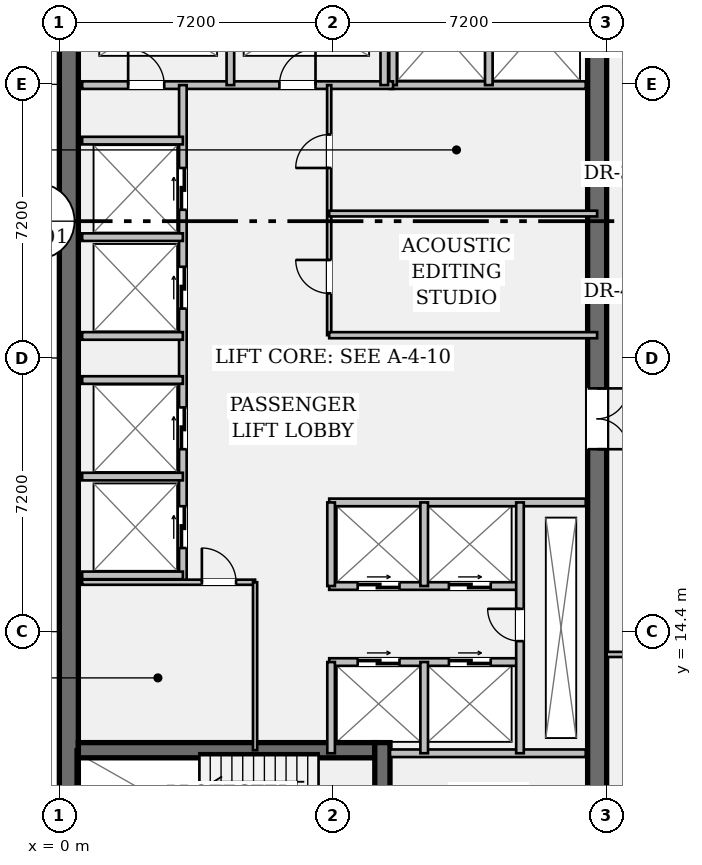
"""IFC4 building model, lengths in metres.
Left out: names, types, materials, properties, quantities, classifications, styles, units other than length and angle.
Written with IfcOpenShell. Run it as: python <this file> out.ifc"""

import sys

from ifc_helpers import new_model, si_unit, direction, frame, frame_2d, origin, place, context, subcontext, project, spatial, rectangle, extrude, element, fill, save


model = new_model("IFC4")
c1 = context("Model", 3, precision=1e-05, world=origin(), true_north=direction((0.0, 1.0)))
c2 = subcontext(c1, "Body", "Model", "MODEL_VIEW")
j1 = project(units=[si_unit("LENGTHUNIT", "METRE"), si_unit("PLANEANGLEUNIT", "RADIAN")], contexts=[c1])
p1 = place(None, origin())
s1 = spatial("IfcSite", under=j1, at=p1, CompositionType="ELEMENT")
p2 = place(p1, origin())
s2 = spatial("IfcBuilding", under=s1, at=p2, CompositionType="ELEMENT")
p3 = place(p2, frame((0.0, 0.0, 168.7)))
s3 = spatial("IfcBuildingStorey", under=s2, at=p3, CompositionType="ELEMENT", Elevation=168.7)
p4 = place(p3, frame((0.25, 7.2, 0.0), z_axis=(0.0, 0.0, 1.0), x_axis=(0.0, 1.0, 0.0)))
e1 = element("IfcWall", 1, at=p4, inside=s3, PredefinedType="SHEAR", context=c2, shape_type="SweptSolid", body=[
    extrude(rectangle(XDim=28.8, YDim=0.5, at=frame_2d((14.4, 0.0))), origin(), (0.0, 0.0, 1.0), 4.29),
])
p5 = place(p3, frame((14.15, 35.5, 0.0), z_axis=(0.0, 0.0, 1.0), x_axis=(0.0, -1.0, 0.0)))
e2 = element("IfcWall", 2, at=p5, inside=s3, PredefinedType="SHEAR", context=c2, shape_type="SweptSolid", body=[
    extrude(rectangle(XDim=27.8, YDim=0.5, at=frame_2d((13.9, 0.0))), origin(), (0.0, 0.0, 1.0), 4.29),
])
p6 = place(p5, frame((1.4, 0.0, 0.0)))
e3 = element("IfcOpeningElement", 3, at=p6, cuts=e2, PredefinedType="OPENING", context=c2, shape_type="SweptSolid", body=[
    extrude(rectangle(XDim=1.2, YDim=2.15, at=frame_2d((0.6, 1.075))), frame((0.0, 0.262, 0.0), z_axis=(0.0, -1.0, 0.0), x_axis=(1.0, 0.0, 0.0)), (0.0, 0.0, 1.0), 0.524),
])
p7 = place(p5, frame((25.35, 0.0, 0.0)))
e4 = element("IfcOpeningElement", 4, at=p7, cuts=e2, PredefinedType="OPENING", context=c2, shape_type="SweptSolid", body=[
    extrude(rectangle(XDim=1.2, YDim=2.15, at=frame_2d((0.6, 1.075))), frame((0.0, 0.262, 0.0), z_axis=(0.0, -1.0, 0.0), x_axis=(1.0, 0.0, 0.0)), (0.0, 0.0, 1.0), 0.524),
])
p8 = place(p5, frame((14.7, 0.0, 0.0)))
e5 = element("IfcOpeningElement", 5, at=p8, cuts=e2, PredefinedType="OPENING", context=c2, shape_type="SweptSolid", body=[
    extrude(rectangle(XDim=1.6, YDim=2.2, at=frame_2d((0.8, 1.1))), frame((0.0, 0.262, 0.0), z_axis=(0.0, -1.0, 0.0), x_axis=(1.0, 0.0, 0.0)), (0.0, 0.0, 1.0), 0.524),
])
p9 = place(p3, frame((0.5, 11.28, 0.0), z_axis=(0.0, 0.0, 1.0), x_axis=(1.0, 0.0, 0.0)))
e6 = element("IfcWall", 6, at=p9, inside=s3, PredefinedType="SHEAR", context=c2, shape_type="SweptSolid", body=[
    extrude(rectangle(XDim=7.8, YDim=0.4, at=frame_2d((3.9, 0.0))), origin(), (0.0, 0.0, 1.0), 4.29),
])
p10 = place(p3, frame((8.5, 7.7, 0.0), z_axis=(0.0, 0.0, 1.0), x_axis=(0.0, 1.0, 0.0)))
e7 = element("IfcWall", 7, at=p10, inside=s3, PredefinedType="SHEAR", context=c2, shape_type="SweptSolid", body=[
    extrude(rectangle(XDim=3.78, YDim=0.4, at=frame_2d((1.89, 0.0))), origin(), (0.0, 0.0, 1.0), 4.29),
])
p11 = place(p10, frame((0.85, 0.0, 0.0)))
e8 = element("IfcOpeningElement", 8, at=p11, cuts=e7, PredefinedType="OPENING", context=c2, shape_type="SweptSolid", body=[
    extrude(rectangle(XDim=1.1, YDim=2.15, at=frame_2d((0.55, 1.075))), frame((0.0, 0.212, 0.0), z_axis=(0.0, -1.0, 0.0), x_axis=(1.0, 0.0, 0.0)), (0.0, 0.0, 1.0), 0.424),
])
for number, where, z_axis, x_axis in (
    (9, (8.7, 11.2, 0.0), (0.0, 0.0, 1.0), (1.0, 0.0, 0.0)),
    (10, (8.7, 28.78, 0.0), (0.0, 0.0, 1.0), (1.0, 0.0, 0.0)),
):
    element("IfcWall", number, at=place(p3, frame(where, z_axis=z_axis, x_axis=x_axis)), inside=s3, PredefinedType="PARTITIONING", context=c2, shape_type="SweptSolid", body=[
        extrude(rectangle(XDim=5.15, YDim=0.2, at=frame_2d((2.575, 0.0))), origin(), (0.0, 0.0, 1.0), 4.29),
    ])
for number, where, z_axis, x_axis in (
    (11, (8.78, 28.78, 0.0), (0.0, 0.0, 1.0), (0.0, 1.0, 0.0)),
    (12, (11.3, 28.78, 0.0), (0.0, 0.0, 1.0), (0.0, 1.0, 0.0)),
):
    element("IfcWall", number, at=place(p3, frame(where, z_axis=z_axis, x_axis=x_axis)), inside=s3, PredefinedType="PARTITIONING", context=c2, shape_type="SweptSolid", body=[
        extrude(rectangle(XDim=3.1, YDim=0.2, at=frame_2d((1.55, 0.0))), origin(), (0.0, 0.0, 1.0), 4.29),
    ])
p12 = place(p3, frame((0.6, 28.78, 0.0), z_axis=(0.0, 0.0, 1.0), x_axis=(1.0, 0.0, 0.0)))
e13 = element("IfcWall", 13, at=p12, inside=s3, PredefinedType="PARTITIONING", context=c2, shape_type="SweptSolid", body=[
    extrude(rectangle(XDim=8.18, YDim=0.2, at=frame_2d((4.09, 0.0))), origin(), (0.0, 0.0, 1.0), 4.29),
])
p13 = place(p12, frame((1.21, 0.0, 0.0)))
e14 = element("IfcOpeningElement", 14, at=p13, cuts=e13, PredefinedType="OPENING", context=c2, shape_type="SweptSolid", body=[
    extrude(rectangle(XDim=0.95, YDim=2.15, at=frame_2d((0.475, 1.075))), frame((0.0, 0.112, 0.0), z_axis=(0.0, -1.0, 0.0), x_axis=(1.0, 0.0, 0.0)), (0.0, 0.0, 1.0), 0.224),
])
p14 = place(p12, frame((5.19, 0.0, 0.0)))
e15 = element("IfcOpeningElement", 15, at=p14, cuts=e13, PredefinedType="OPENING", context=c2, shape_type="SweptSolid", body=[
    extrude(rectangle(XDim=0.95, YDim=2.15, at=frame_2d((0.475, 1.075))), frame((0.0, 0.112, 0.0), z_axis=(0.0, -1.0, 0.0), x_axis=(1.0, 0.0, 0.0)), (0.0, 0.0, 1.0), 0.224),
])
for number, where, z_axis, x_axis in (
    (16, (4.5, 28.78, 0.0), (0.0, 0.0, 1.0), (0.0, 1.0, 0.0)),
    (17, (8.55, 28.78, 0.0), (0.0, 0.0, 1.0), (0.0, 1.0, 0.0)),
):
    element("IfcWall", number, at=place(p3, frame(where, z_axis=z_axis, x_axis=x_axis)), inside=s3, PredefinedType="PARTITIONING", context=c2, shape_type="SweptSolid", body=[
        extrude(rectangle(XDim=2.94, YDim=0.2, at=frame_2d((1.47, 0.0))), origin(), (0.0, 0.0, 1.0), 4.29),
    ])
p15 = place(p3, frame((3.25, 15.7, 0.0), z_axis=(0.0, 0.0, 1.0), x_axis=(0.0, 1.0, 0.0)))
e18 = element("IfcWall", 18, at=p15, inside=s3, PredefinedType="PARTITIONING", context=c2, shape_type="SweptSolid", body=[
    extrude(rectangle(XDim=13.08, YDim=0.2, at=frame_2d((6.54, 0.0))), origin(), (0.0, 0.0, 1.0), 4.29),
])
p16 = place(p15, frame((0.9, 0.0, 0.0)))
e19 = element("IfcOpeningElement", 19, at=p16, cuts=e18, PredefinedType="OPENING", context=c2, shape_type="SweptSolid", body=[
    extrude(rectangle(XDim=1.1, YDim=2.2, at=frame_2d((0.55, 1.1))), frame((0.0, 0.112, 0.0), z_axis=(0.0, -1.0, 0.0), x_axis=(1.0, 0.0, 0.0)), (0.0, 0.0, 1.0), 0.224),
])
p17 = place(p15, frame((3.5, 0.0, 0.0)))
e20 = element("IfcOpeningElement", 20, at=p17, cuts=e18, PredefinedType="OPENING", context=c2, shape_type="SweptSolid", body=[
    extrude(rectangle(XDim=1.1, YDim=2.2, at=frame_2d((0.55, 1.1))), frame((0.0, 0.112, 0.0), z_axis=(0.0, -1.0, 0.0), x_axis=(1.0, 0.0, 0.0)), (0.0, 0.0, 1.0), 0.224),
])
p18 = place(p15, frame((7.2, 0.0, 0.0)))
e21 = element("IfcOpeningElement", 21, at=p18, cuts=e18, PredefinedType="OPENING", context=c2, shape_type="SweptSolid", body=[
    extrude(rectangle(XDim=1.1, YDim=2.2, at=frame_2d((0.55, 1.1))), frame((0.0, 0.112, 0.0), z_axis=(0.0, -1.0, 0.0), x_axis=(1.0, 0.0, 0.0)), (0.0, 0.0, 1.0), 0.224),
])
p19 = place(p15, frame((9.8, 0.0, 0.0)))
e22 = element("IfcOpeningElement", 22, at=p19, cuts=e18, PredefinedType="OPENING", context=c2, shape_type="SweptSolid", body=[
    extrude(rectangle(XDim=1.1, YDim=2.2, at=frame_2d((0.55, 1.1))), frame((0.0, 0.112, 0.0), z_axis=(0.0, -1.0, 0.0), x_axis=(1.0, 0.0, 0.0)), (0.0, 0.0, 1.0), 0.224),
])
for number, where, z_axis, x_axis in (
    (23, (0.6, 15.88, 0.0), (0.0, 0.0, 1.0), (1.0, 0.0, 0.0)),
    (24, (0.6, 18.48, 0.0), (0.0, 0.0, 1.0), (1.0, 0.0, 0.0)),
    (25, (0.6, 22.18, 0.0), (0.0, 0.0, 1.0), (1.0, 0.0, 0.0)),
    (26, (0.6, 24.78, 0.0), (0.0, 0.0, 1.0), (1.0, 0.0, 0.0)),
    (27, (0.6, 21.02, 0.0), (0.0, 0.0, 1.0), (1.0, 0.0, 0.0)),
    (28, (0.6, 27.32, 0.0), (0.0, 0.0, 1.0), (1.0, 0.0, 0.0)),
):
    element("IfcWall", number, at=place(p3, frame(where, z_axis=z_axis, x_axis=x_axis)), inside=s3, PredefinedType="PARTITIONING", context=c2, shape_type="SweptSolid", body=[
        extrude(rectangle(XDim=2.65, YDim=0.2, at=frame_2d((1.325, 0.0))), origin(), (0.0, 0.0, 1.0), 4.29),
    ])
p20 = place(p3, frame((7.1, 22.2, 0.0), z_axis=(0.0, 0.0, 1.0), x_axis=(0.0, 1.0, 0.0)))
e29 = element("IfcWall", 29, at=p20, inside=s3, PredefinedType="PARTITIONING", context=c2, shape_type="SweptSolid", body=[
    extrude(rectangle(XDim=6.58, YDim=0.11, at=frame_2d((3.29, 0.0))), origin(), (0.0, 0.0, 1.0), 4.29),
])
p21 = place(p20, frame((1.1, 0.0, 0.0)))
e30 = element("IfcOpeningElement", 30, at=p21, cuts=e29, PredefinedType="OPENING", context=c2, shape_type="SweptSolid", body=[
    extrude(rectangle(XDim=0.88, YDim=2.15, at=frame_2d((0.44, 1.075))), frame((0.0, 0.067, 0.0), z_axis=(0.0, -1.0, 0.0), x_axis=(1.0, 0.0, 0.0)), (0.0, 0.0, 1.0), 0.134),
])
p22 = place(p20, frame((4.4, 0.0, 0.0)))
e31 = element("IfcOpeningElement", 31, at=p22, cuts=e29, PredefinedType="OPENING", context=c2, shape_type="SweptSolid", body=[
    extrude(rectangle(XDim=0.88, YDim=2.15, at=frame_2d((0.44, 1.075))), frame((0.0, 0.067, 0.0), z_axis=(0.0, -1.0, 0.0), x_axis=(1.0, 0.0, 0.0)), (0.0, 0.0, 1.0), 0.134),
])
p23 = place(p3, frame((7.1, 22.2, 0.0), z_axis=(0.0, 0.0, 1.0), x_axis=(1.0, 0.0, 0.0)))
e32 = element("IfcWall", 32, at=p23, inside=s3, PredefinedType="PARTITIONING", context=c2, shape_type="SweptSolid", body=[
    extrude(rectangle(XDim=7.05, YDim=0.16, at=frame_2d((3.525, 0.0))), origin(), (0.0, 0.0, 1.0), 4.29),
])
p24 = place(p3, frame((7.1, 25.4, 0.0), z_axis=(0.0, 0.0, 1.0), x_axis=(1.0, 0.0, 0.0)))
e33 = element("IfcWall", 33, at=p24, inside=s3, PredefinedType="PARTITIONING", context=c2, shape_type="SweptSolid", body=[
    extrude(rectangle(XDim=7.05, YDim=0.15, at=frame_2d((3.525, 0.0))), origin(), (0.0, 0.0, 1.0), 4.29),
])
p25 = place(p3, frame((7.1, 17.8, 0.0), z_axis=(0.0, 0.0, 1.0), x_axis=(1.0, 0.0, 0.0)))
e34 = element("IfcWall", 34, at=p25, inside=s3, PredefinedType="PARTITIONING", context=c2, shape_type="SweptSolid", body=[
    extrude(rectangle(XDim=6.75, YDim=0.2, at=frame_2d((3.375, 0.0))), origin(), (0.0, 0.0, 1.0), 4.29),
])
p26 = place(p3, frame((7.1, 15.6, 0.0), z_axis=(0.0, 0.0, 1.0), x_axis=(1.0, 0.0, 0.0)))
e35 = element("IfcWall", 35, at=p26, inside=s3, PredefinedType="PARTITIONING", context=c2, shape_type="SweptSolid", body=[
    extrude(rectangle(XDim=5.02, YDim=0.2, at=frame_2d((2.51, 0.0))), origin(), (0.0, 0.0, 1.0), 4.29),
])
p27 = place(p26, frame((0.75, 0.0, 0.0)))
e36 = element("IfcOpeningElement", 36, at=p27, cuts=e35, PredefinedType="OPENING", context=c2, shape_type="SweptSolid", body=[
    extrude(rectangle(XDim=1.1, YDim=2.2, at=frame_2d((0.55, 1.1))), frame((0.0, 0.112, 0.0), z_axis=(0.0, -1.0, 0.0), x_axis=(1.0, 0.0, 0.0)), (0.0, 0.0, 1.0), 0.224),
])
p28 = place(p26, frame((3.15, 0.0, 0.0)))
e37 = element("IfcOpeningElement", 37, at=p28, cuts=e35, PredefinedType="OPENING", context=c2, shape_type="SweptSolid", body=[
    extrude(rectangle(XDim=1.1, YDim=2.2, at=frame_2d((0.55, 1.1))), frame((0.0, 0.112, 0.0), z_axis=(0.0, -1.0, 0.0), x_axis=(1.0, 0.0, 0.0)), (0.0, 0.0, 1.0), 0.224),
])
p29 = place(p3, frame((7.1, 13.6, 0.0), z_axis=(0.0, 0.0, 1.0), x_axis=(1.0, 0.0, 0.0)))
e38 = element("IfcWall", 38, at=p29, inside=s3, PredefinedType="PARTITIONING", context=c2, shape_type="SweptSolid", body=[
    extrude(rectangle(XDim=5.02, YDim=0.2, at=frame_2d((2.51, 0.0))), origin(), (0.0, 0.0, 1.0), 4.29),
])
p30 = place(p29, frame((0.75, 0.0, 0.0)))
e39 = element("IfcOpeningElement", 39, at=p30, cuts=e38, PredefinedType="OPENING", context=c2, shape_type="SweptSolid", body=[
    extrude(rectangle(XDim=1.1, YDim=2.2, at=frame_2d((0.55, 1.1))), frame((0.0, 0.112, 0.0), z_axis=(0.0, -1.0, 0.0), x_axis=(1.0, 0.0, 0.0)), (0.0, 0.0, 1.0), 0.224),
])
p31 = place(p29, frame((3.15, 0.0, 0.0)))
e40 = element("IfcOpeningElement", 40, at=p31, cuts=e38, PredefinedType="OPENING", context=c2, shape_type="SweptSolid", body=[
    extrude(rectangle(XDim=1.1, YDim=2.2, at=frame_2d((0.55, 1.1))), frame((0.0, 0.112, 0.0), z_axis=(0.0, -1.0, 0.0), x_axis=(1.0, 0.0, 0.0)), (0.0, 0.0, 1.0), 0.224),
])
p32 = place(p3, frame((7.15, 15.6, 0.0), z_axis=(0.0, 0.0, 1.0), x_axis=(0.0, 1.0, 0.0)))
e41 = element("IfcWall", 41, at=p32, inside=s3, PredefinedType="PARTITIONING", context=c2, shape_type="SweptSolid", body=[
    extrude(rectangle(XDim=2.2, YDim=0.2, at=frame_2d((1.1, 0.0))), origin(), (0.0, 0.0, 1.0), 4.29),
])
p33 = place(p3, frame((7.15, 11.2, 0.0), z_axis=(0.0, 0.0, 1.0), x_axis=(0.0, 1.0, 0.0)))
e42 = element("IfcWall", 42, at=p33, inside=s3, PredefinedType="PARTITIONING", context=c2, shape_type="SweptSolid", body=[
    extrude(rectangle(XDim=2.4, YDim=0.2, at=frame_2d((1.2, 0.0))), origin(), (0.0, 0.0, 1.0), 4.29),
])
p34 = place(p3, frame((9.6, 15.6, 0.0), z_axis=(0.0, 0.0, 1.0), x_axis=(0.0, 1.0, 0.0)))
e43 = element("IfcWall", 43, at=p34, inside=s3, PredefinedType="PARTITIONING", context=c2, shape_type="SweptSolid", body=[
    extrude(rectangle(XDim=2.2, YDim=0.2, at=frame_2d((1.1, 0.0))), origin(), (0.0, 0.0, 1.0), 4.29),
])
p35 = place(p3, frame((9.6, 11.2, 0.0), z_axis=(0.0, 0.0, 1.0), x_axis=(0.0, 1.0, 0.0)))
e44 = element("IfcWall", 44, at=p35, inside=s3, PredefinedType="PARTITIONING", context=c2, shape_type="SweptSolid", body=[
    extrude(rectangle(XDim=2.4, YDim=0.2, at=frame_2d((1.2, 0.0))), origin(), (0.0, 0.0, 1.0), 4.29),
])
p36 = place(p3, frame((12.12, 11.2, 0.0), z_axis=(0.0, 0.0, 1.0), x_axis=(0.0, 1.0, 0.0)))
e45 = element("IfcWall", 45, at=p36, inside=s3, PredefinedType="PARTITIONING", context=c2, shape_type="SweptSolid", body=[
    extrude(rectangle(XDim=6.6, YDim=0.2, at=frame_2d((3.3, 0.0))), origin(), (0.0, 0.0, 1.0), 4.29),
])
p37 = place(p36, frame((2.95, 0.0, 0.0)))
e46 = element("IfcOpeningElement", 46, at=p37, cuts=e45, PredefinedType="OPENING", context=c2, shape_type="SweptSolid", body=[
    extrude(rectangle(XDim=0.85, YDim=2.15, at=frame_2d((0.425, 1.075))), frame((0.0, 0.112, 0.0), z_axis=(0.0, -1.0, 0.0), x_axis=(1.0, 0.0, 0.0)), (0.0, 0.0, 1.0), 0.224),
])
p38 = place(p3, frame((0.6, 15.7, 0.0), z_axis=(0.0, 0.0, 1.0), x_axis=(1.0, 0.0, 0.0)))
e47 = element("IfcWall", 47, at=p38, inside=s3, PredefinedType="PARTITIONING", context=c2, shape_type="SweptSolid", body=[
    extrude(rectangle(XDim=4.55, YDim=0.135, at=frame_2d((2.275, 0.0))), origin(), (0.0, 0.0, 1.0), 4.29),
])
p39 = place(p38, frame((3.15, 0.0, 0.0)))
e48 = element("IfcOpeningElement", 48, at=p39, cuts=e47, PredefinedType="OPENING", context=c2, shape_type="SweptSolid", body=[
    extrude(rectangle(XDim=0.9, YDim=2.15, at=frame_2d((0.45, 1.075))), frame((0.0, 0.08, 0.0), z_axis=(0.0, -1.0, 0.0), x_axis=(1.0, 0.0, 0.0)), (0.0, 0.0, 1.0), 0.159),
])
p40 = place(p3, frame((5.15, 11.28, 0.0), z_axis=(0.0, 0.0, 1.0), x_axis=(0.0, 1.0, 0.0)))
e49 = element("IfcWall", 49, at=p40, inside=s3, PredefinedType="PARTITIONING", context=c2, shape_type="SweptSolid", body=[
    extrude(rectangle(XDim=4.42, YDim=0.11, at=frame_2d((2.21, 0.0))), origin(), (0.0, 0.0, 1.0), 4.29),
])
p41 = place(p3, frame((14.4, 13.8, 0.0), z_axis=(0.0, 0.0, 1.0), x_axis=(1.0, 0.0, 0.0)))
e50 = element("IfcWall", 50, at=p41, inside=s3, PredefinedType="PARTITIONING", context=c2, shape_type="SweptSolid", body=[
    extrude(rectangle(XDim=29.48, YDim=0.135, at=frame_2d((14.74, 0.0))), origin(), (0.0, 0.0, 1.0), 3.653),
])
p42 = place(p41, frame((4.72, 0.0, 0.0)))
e51 = element("IfcOpeningElement", 51, at=p42, cuts=e50, PredefinedType="OPENING", context=c2, shape_type="SweptSolid", body=[
    extrude(rectangle(XDim=1.05, YDim=2.15, at=frame_2d((0.525, 1.075))), frame((0.0, 0.08, 0.0), z_axis=(0.0, -1.0, 0.0), x_axis=(1.0, 0.0, 0.0)), (0.0, 0.0, 1.0), 0.159),
])
p43 = place(p41, frame((13.0, 0.0, 0.0)))
e52 = element("IfcOpeningElement", 52, at=p43, cuts=e50, PredefinedType="OPENING", context=c2, shape_type="SweptSolid", body=[
    extrude(rectangle(XDim=0.88, YDim=2.15, at=frame_2d((0.44, 1.075))), frame((0.0, 0.08, 0.0), z_axis=(0.0, -1.0, 0.0), x_axis=(1.0, 0.0, 0.0)), (0.0, 0.0, 1.0), 0.159),
])
p44 = place(p13, origin())
e53 = element("IfcDoor", 53, at=p44, inside=s3, OperationType="SINGLE_SWING_LEFT", PredefinedType="DOOR", context=c2, shape_type="SweptSolid", body=[
    extrude(rectangle(XDim=0.95, YDim=2.15, at=frame_2d((0.475, 1.075))), frame((0.0, 0.025, 0.0), z_axis=(0.0, -1.0, 0.0), x_axis=(1.0, 0.0, 0.0)), (0.0, 0.0, 1.0), 0.05),
])
fill(e14, e53)
p45 = place(p14, origin())
e54 = element("IfcDoor", 54, at=p45, inside=s3, OperationType="SINGLE_SWING_RIGHT", PredefinedType="DOOR", context=c2, shape_type="SweptSolid", body=[
    extrude(rectangle(XDim=0.95, YDim=2.15, at=frame_2d((0.475, 1.075))), frame((0.0, 0.025, 0.0), z_axis=(0.0, -1.0, 0.0), x_axis=(1.0, 0.0, 0.0)), (0.0, 0.0, 1.0), 0.05),
])
fill(e15, e54)
p46 = place(p8, origin())
e55 = element("IfcDoor", 55, at=p46, inside=s3, OperationType="DOUBLE_DOOR_SINGLE_SWING", PredefinedType="DOOR", context=c2, shape_type="SweptSolid", body=[
    extrude(rectangle(XDim=1.6, YDim=2.2, at=frame_2d((0.8, 1.1))), frame((0.0, 0.025, 0.0), z_axis=(0.0, -1.0, 0.0), x_axis=(1.0, 0.0, 0.0)), (0.0, 0.0, 1.0), 0.05),
])
fill(e5, e55)
p47 = place(p16, origin())
e56 = element("IfcDoor", 56, at=p47, inside=s3, OperationType="DOUBLE_DOOR_SLIDING", PredefinedType="DOOR", context=c2, shape_type="SweptSolid", body=[
    extrude(rectangle(XDim=1.1, YDim=2.2, at=frame_2d((0.55, 1.1))), frame((0.0, 0.025, 0.0), z_axis=(0.0, -1.0, 0.0), x_axis=(1.0, 0.0, 0.0)), (0.0, 0.0, 1.0), 0.05),
])
fill(e19, e56)
p48 = place(p17, origin())
e57 = element("IfcDoor", 57, at=p48, inside=s3, OperationType="DOUBLE_DOOR_SLIDING", PredefinedType="DOOR", context=c2, shape_type="SweptSolid", body=[
    extrude(rectangle(XDim=1.1, YDim=2.2, at=frame_2d((0.55, 1.1))), frame((0.0, 0.025, 0.0), z_axis=(0.0, -1.0, 0.0), x_axis=(1.0, 0.0, 0.0)), (0.0, 0.0, 1.0), 0.05),
])
fill(e20, e57)
p49 = place(p18, origin())
e58 = element("IfcDoor", 58, at=p49, inside=s3, OperationType="DOUBLE_DOOR_SLIDING", PredefinedType="DOOR", context=c2, shape_type="SweptSolid", body=[
    extrude(rectangle(XDim=1.1, YDim=2.2, at=frame_2d((0.55, 1.1))), frame((0.0, 0.025, 0.0), z_axis=(0.0, -1.0, 0.0), x_axis=(1.0, 0.0, 0.0)), (0.0, 0.0, 1.0), 0.05),
])
fill(e21, e58)
p50 = place(p19, origin())
e59 = element("IfcDoor", 59, at=p50, inside=s3, OperationType="DOUBLE_DOOR_SLIDING", PredefinedType="DOOR", context=c2, shape_type="SweptSolid", body=[
    extrude(rectangle(XDim=1.1, YDim=2.2, at=frame_2d((0.55, 1.1))), frame((0.0, 0.025, 0.0), z_axis=(0.0, -1.0, 0.0), x_axis=(1.0, 0.0, 0.0)), (0.0, 0.0, 1.0), 0.05),
])
fill(e22, e59)
p51 = place(p21, origin())
e60 = element("IfcDoor", 60, at=p51, inside=s3, OperationType="SINGLE_SWING_RIGHT", PredefinedType="DOOR", context=c2, shape_type="SweptSolid", body=[
    extrude(rectangle(XDim=0.88, YDim=2.15, at=frame_2d((0.44, 1.075))), frame((0.0, 0.025, 0.0), z_axis=(0.0, -1.0, 0.0), x_axis=(1.0, 0.0, 0.0)), (0.0, 0.0, 1.0), 0.05),
])
fill(e30, e60)
p52 = place(p22, origin())
e61 = element("IfcDoor", 61, at=p52, inside=s3, OperationType="SINGLE_SWING_LEFT", PredefinedType="DOOR", context=c2, shape_type="SweptSolid", body=[
    extrude(rectangle(XDim=0.88, YDim=2.15, at=frame_2d((0.44, 1.075))), frame((0.0, 0.025, 0.0), z_axis=(0.0, -1.0, 0.0), x_axis=(1.0, 0.0, 0.0)), (0.0, 0.0, 1.0), 0.05),
])
fill(e31, e61)
p53 = place(p37, origin())
e62 = element("IfcDoor", 62, at=p53, inside=s3, OperationType="SINGLE_SWING_RIGHT", PredefinedType="DOOR", context=c2, shape_type="SweptSolid", body=[
    extrude(rectangle(XDim=0.85, YDim=2.15, at=frame_2d((0.425, 1.075))), frame((0.0, 0.025, 0.0), z_axis=(0.0, -1.0, 0.0), x_axis=(1.0, 0.0, 0.0)), (0.0, 0.0, 1.0), 0.05),
])
fill(e46, e62)
p54 = place(p27, origin())
e63 = element("IfcDoor", 63, at=p54, inside=s3, OperationType="DOUBLE_DOOR_SLIDING", PredefinedType="DOOR", context=c2, shape_type="SweptSolid", body=[
    extrude(rectangle(XDim=1.1, YDim=2.2, at=frame_2d((0.55, 1.1))), frame((0.0, 0.025, 0.0), z_axis=(0.0, -1.0, 0.0), x_axis=(1.0, 0.0, 0.0)), (0.0, 0.0, 1.0), 0.05),
])
fill(e36, e63)
p55 = place(p28, origin())
e64 = element("IfcDoor", 64, at=p55, inside=s3, OperationType="DOUBLE_DOOR_SLIDING", PredefinedType="DOOR", context=c2, shape_type="SweptSolid", body=[
    extrude(rectangle(XDim=1.1, YDim=2.2, at=frame_2d((0.55, 1.1))), frame((0.0, 0.025, 0.0), z_axis=(0.0, -1.0, 0.0), x_axis=(1.0, 0.0, 0.0)), (0.0, 0.0, 1.0), 0.05),
])
fill(e37, e64)
p56 = place(p30, origin())
e65 = element("IfcDoor", 65, at=p56, inside=s3, OperationType="DOUBLE_DOOR_SLIDING", PredefinedType="DOOR", context=c2, shape_type="SweptSolid", body=[
    extrude(rectangle(XDim=1.1, YDim=2.2, at=frame_2d((0.55, 1.1))), frame((0.0, 0.025, 0.0), z_axis=(0.0, -1.0, 0.0), x_axis=(1.0, 0.0, 0.0)), (0.0, 0.0, 1.0), 0.05),
])
fill(e39, e65)
p57 = place(p31, origin())
e66 = element("IfcDoor", 66, at=p57, inside=s3, OperationType="DOUBLE_DOOR_SLIDING", PredefinedType="DOOR", context=c2, shape_type="SweptSolid", body=[
    extrude(rectangle(XDim=1.1, YDim=2.2, at=frame_2d((0.55, 1.1))), frame((0.0, 0.025, 0.0), z_axis=(0.0, -1.0, 0.0), x_axis=(1.0, 0.0, 0.0)), (0.0, 0.0, 1.0), 0.05),
])
fill(e40, e66)
p58 = place(p39, origin())
e67 = element("IfcDoor", 67, at=p58, inside=s3, OperationType="SINGLE_SWING_LEFT", PredefinedType="DOOR", context=c2, shape_type="SweptSolid", body=[
    extrude(rectangle(XDim=0.9, YDim=2.15, at=frame_2d((0.45, 1.075))), frame((0.0, 0.025, 0.0), z_axis=(0.0, -1.0, 0.0), x_axis=(1.0, 0.0, 0.0)), (0.0, 0.0, 1.0), 0.05),
])
fill(e48, e67)
save(model, sys.argv[1])
